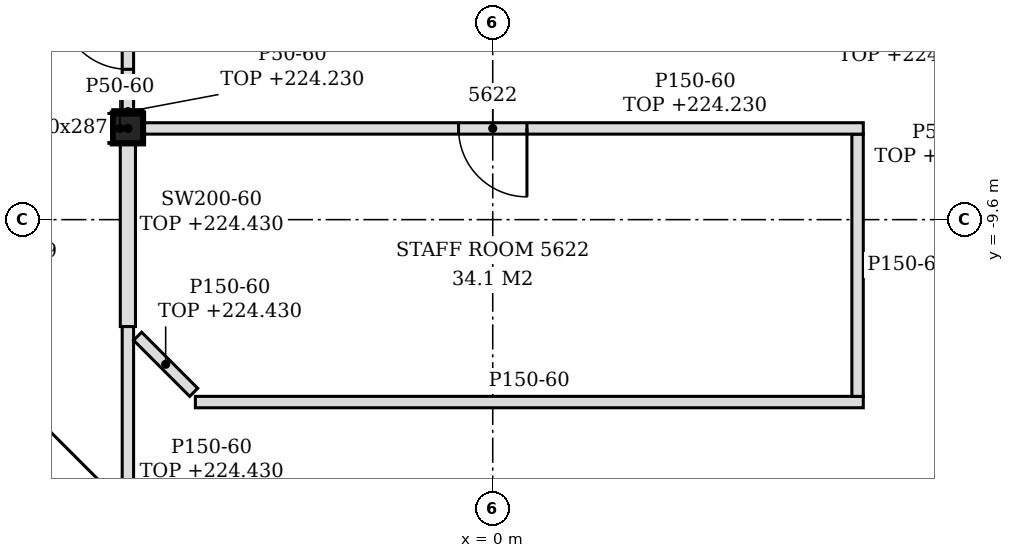
"""IFC4 building model, lengths in metres.
Left out: names, types, materials, properties, quantities, classifications, styles, units other than length and angle.
Written with IfcOpenShell. Run it as: python <this file> out.ifc"""

import sys

from ifc_helpers import new_model, si_unit, direction, frame, frame_2d, origin, origin_2d, place, context, subcontext, project, spatial, polyline, rectangle, i_section, outline, extrude, element, fill, save


model = new_model("IFC4")
c1 = context("Model", 3, precision=1e-05, world=origin(), true_north=direction((0.0, 1.0)))
c2 = subcontext(c1, "Body", "Model", "MODEL_VIEW")
j1 = project(units=[si_unit("LENGTHUNIT", "METRE"), si_unit("PLANEANGLEUNIT", "RADIAN")], contexts=[c1])
p1 = place(None, origin())
s1 = spatial("IfcSite", under=j1, at=p1, CompositionType="ELEMENT")
p2 = place(p1, origin())
s2 = spatial("IfcBuilding", under=s1, at=p2, CompositionType="ELEMENT")
p3 = place(p2, frame((0.0, 0.0, 221.4)))
s3 = spatial("IfcBuildingStorey", under=s2, at=p3, CompositionType="ELEMENT", Elevation=221.4)
p4 = place(p3, frame((-4.8, -8.4, -0.15), z_axis=(0.0, 0.0, 1.0), x_axis=(1.0, 0.0, 0.0)))
e1 = element("IfcColumn", 1, at=p4, inside=s3, PredefinedType="COLUMN", context=c2, shape_type="SweptSolid", body=[
    extrude(i_section(OverallWidth=0.399, OverallDepth=0.393, WebThickness=0.023, FlangeThickness=0.037, FilletRadius=0.015, at=origin_2d()), origin(), (0.0, 0.0, 1.0), 3.6),
])
p5 = place(p3, frame((-4.8, -13.926, 0.0), z_axis=(0.0, 0.0, 1.0), x_axis=(0.0, 1.0, 0.0)))
e2 = element("IfcWall", 2, at=p5, inside=s3, PredefinedType="PARTITIONING", context=c2, shape_type="SweptSolid", body=[
    extrude(outline(polyline([(0.0, 0.0), (2.92, 0.0), (2.92, 3.03), (1.369, 3.03), (1.367, 2.63), (0.229, 2.63), (0.227, 3.03), (0.0, 3.03), (0.0, 0.0)])), frame((0.0, 0.075, 0.0), z_axis=(0.0, -1.0, 0.0), x_axis=(1.0, 0.0, 0.0)), (0.0, 0.0, 1.0), 0.15),
])
p6 = place(p3, frame((-3.912, -12.0, 0.0), z_axis=(0.0, 0.0, 1.0), x_axis=(1.0, 0.0, 0.0)))
e3 = element("IfcWall", 3, at=p6, inside=s3, PredefinedType="PARTITIONING", context=c2, shape_type="SweptSolid", body=[
    extrude(rectangle(XDim=8.787, YDim=0.15, at=frame_2d((4.394, 0.0))), origin(), (0.0, 0.0, 1.0), 3.45),
])
p7 = place(p3, frame((-3.934, -11.872, 0.0), z_axis=(0.0, 0.0, 1.0), x_axis=(-0.707106781187, 0.707106781187, 0.0)))
e4 = element("IfcWall", 4, at=p7, inside=s3, PredefinedType="PARTITIONING", context=c2, shape_type="SweptSolid", body=[
    extrude(rectangle(XDim=1.044, YDim=0.15, at=frame_2d((0.522, 0.0))), origin(), (0.0, 0.0, 1.0), 3.03),
])
p8 = place(p3, frame((4.8, -11.925, 0.0), z_axis=(0.0, 0.0, 1.0), x_axis=(0.0, 1.0, 0.0)))
e5 = element("IfcWall", 5, at=p8, inside=s3, PredefinedType="PARTITIONING", context=c2, shape_type="SweptSolid", body=[
    extrude(outline(polyline([(0.0, 0.0), (3.45, 0.0), (3.45, 2.83), (3.375, 2.83), (3.373, 3.45), (0.0, 3.45), (0.0, 0.0)])), frame((0.0, 0.075, 0.0), z_axis=(0.0, -1.0, 0.0), x_axis=(1.0, 0.0, 0.0)), (0.0, 0.0, 1.0), 0.15),
])
p9 = place(p3, frame((-4.8, -11.006, 0.0), z_axis=(0.0, 0.0, 1.0), x_axis=(0.0, 1.0, 0.0)))
e6 = element("IfcWall", 6, at=p9, inside=s3, PredefinedType="PARTITIONING", context=c2, shape_type="SweptSolid", body=[
    extrude(rectangle(XDim=2.41, YDim=0.2, at=frame_2d((1.205, 0.0))), origin(), (0.0, 0.0, 1.0), 3.03),
])
p10 = place(p3, frame((-4.601, -8.4, 0.0), z_axis=(0.0, 0.0, 1.0), x_axis=(1.0, 0.0, 0.0)))
e7 = element("IfcWall", 7, at=p10, inside=s3, PredefinedType="PARTITIONING", context=c2, shape_type="SweptSolid", body=[
    extrude(rectangle(XDim=9.476, YDim=0.15, at=frame_2d((4.738, 0.0))), origin(), (0.0, 0.0, 1.0), 2.83),
])
p11 = place(p10, frame((4.15, 0.0, 0.0)))
e8 = element("IfcOpeningElement", 8, at=p11, cuts=e7, PredefinedType="OPENING", context=c2, shape_type="SweptSolid", body=[
    extrude(rectangle(XDim=0.9, YDim=2.1, at=frame_2d((0.45, 1.05))), frame((0.0, 0.085, 0.0), z_axis=(0.0, -1.0, 0.0), x_axis=(1.0, 0.0, 0.0)), (0.0, 0.0, 1.0), 0.17),
])
p12 = place(p3, frame((-4.8, -8.204, 0.0), z_axis=(0.0, 0.0, 1.0), x_axis=(0.0, 1.0, 0.0)))
e9 = element("IfcWall", 9, at=p12, inside=s3, PredefinedType="PARTITIONING", context=c2, shape_type="SweptSolid", body=[
    extrude(rectangle(XDim=10.407, YDim=0.15, at=frame_2d((5.204, 0.0))), origin(), (0.0, 0.0, 1.0), 2.83),
])
p13 = place(p12, frame((8.354, 0.0, 0.0)))
e10 = element("IfcOpeningElement", 10, at=p13, cuts=e9, PredefinedType="OPENING", context=c2, shape_type="SweptSolid", body=[
    extrude(rectangle(XDim=0.9, YDim=2.1, at=frame_2d((0.45, 1.05))), frame((0.0, 0.085, 0.0), z_axis=(0.0, -1.0, 0.0), x_axis=(1.0, 0.0, 0.0)), (0.0, 0.0, 1.0), 0.17),
])
p14 = place(p12, frame((0.582, 0.0, 0.0)))
e11 = element("IfcOpeningElement", 11, at=p14, cuts=e9, PredefinedType="OPENING", context=c2, shape_type="SweptSolid", body=[
    extrude(rectangle(XDim=0.9, YDim=2.1, at=frame_2d((0.45, 1.05))), frame((0.0, 0.085, 0.0), z_axis=(0.0, -1.0, 0.0), x_axis=(1.0, 0.0, 0.0)), (0.0, 0.0, 1.0), 0.17),
])
p15 = place(p3, frame((-5.024, -8.596, 0.0), z_axis=(0.0, 0.0, 1.0), x_axis=(0.0, 1.0, 0.0)))
e12 = element("IfcWall", 12, at=p15, inside=s3, PredefinedType="PARTITIONING", context=c2, shape_type="SweptSolid", body=[
    extrude(rectangle(XDim=0.393, YDim=0.05, at=frame_2d((0.196, 0.0))), origin(), (0.0, 0.0, 1.0), 3.45),
])
p16 = place(p3, frame((-5.0, -8.178, 0.0), z_axis=(0.0, 0.0, 1.0), x_axis=(1.0, 0.0, 0.0)))
e13 = element("IfcWall", 13, at=p16, inside=s3, PredefinedType="PARTITIONING", context=c2, shape_type="SweptSolid", body=[
    extrude(rectangle(XDim=0.399, YDim=0.05, at=frame_2d((0.199, 0.0))), origin(), (0.0, 0.0, 1.0), 2.83),
])
p17 = place(p14, origin())
e14 = element("IfcDoor", 14, at=p17, inside=s3, OperationType="SINGLE_SWING_RIGHT", PredefinedType="DOOR", context=c2, shape_type="SweptSolid", body=[
    extrude(rectangle(XDim=0.9, YDim=2.1, at=frame_2d((0.45, 1.05))), frame((0.0, 0.025, 0.0), z_axis=(0.0, -1.0, 0.0), x_axis=(1.0, 0.0, 0.0)), (0.0, 0.0, 1.0), 0.05),
])
fill(e11, e14)
p18 = place(p11, frame((0.9, 0.0, 0.0), z_axis=(0.0, 0.0, 1.0), x_axis=(-1.0, 0.0, 0.0)))
e15 = element("IfcDoor", 15, at=p18, inside=s3, OperationType="SINGLE_SWING_LEFT", PredefinedType="DOOR", context=c2, shape_type="SweptSolid", body=[
    extrude(rectangle(XDim=0.9, YDim=2.1, at=frame_2d((0.45, 1.05))), frame((0.0, 0.025, 0.0), z_axis=(0.0, -1.0, 0.0), x_axis=(1.0, 0.0, 0.0)), (0.0, 0.0, 1.0), 0.05),
])
fill(e8, e15)
save(model, sys.argv[1])
